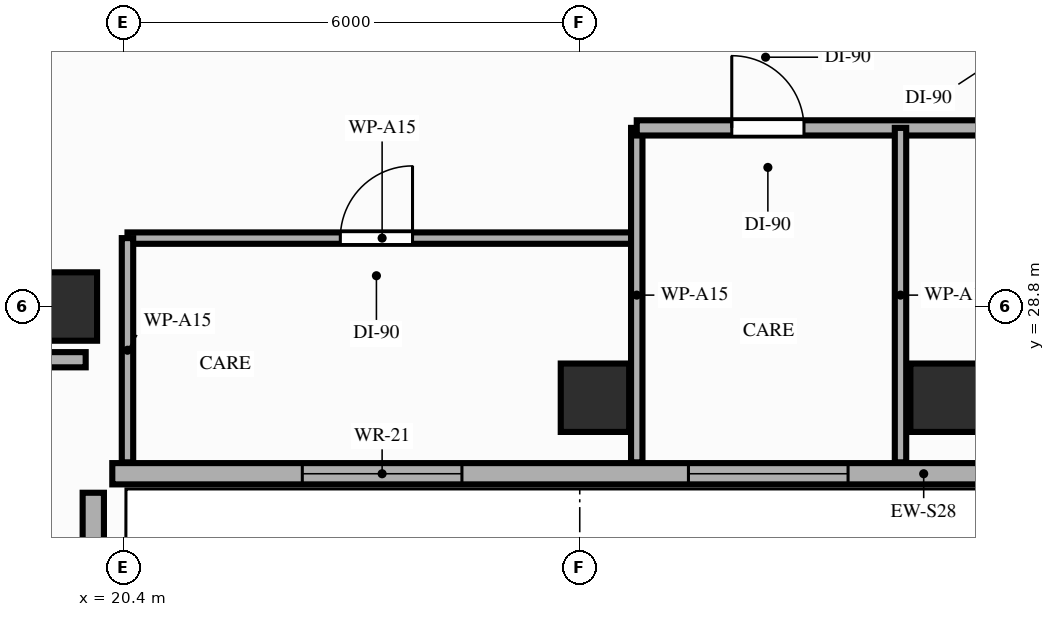
"""IFC4 building model, lengths in metres.
Left out: names, types, materials, properties, quantities, classifications, styles, units other than length and angle.
Written with IfcOpenShell. Run it as: python <this file> out.ifc"""

import sys

from ifc_helpers import new_model, si_unit, direction, frame, frame_2d, origin, origin_2d, place, context, subcontext, project, spatial, rectangle, extrude, element, fill, save


model = new_model("IFC4")
c1 = context("Model", 3, precision=1e-05, world=origin(), true_north=direction((0.0, 1.0)))
c2 = subcontext(c1, "Body", "Model", "MODEL_VIEW")
j1 = project(units=[si_unit("LENGTHUNIT", "METRE"), si_unit("PLANEANGLEUNIT", "RADIAN")], contexts=[c1])
p1 = place(None, origin())
s1 = spatial("IfcSite", under=j1, at=p1, CompositionType="ELEMENT")
p2 = place(p1, origin())
s2 = spatial("IfcBuilding", under=s1, at=p2, CompositionType="ELEMENT")
p3 = place(p2, frame((0.0, 0.0, 192.0)))
s3 = spatial("IfcBuildingStorey", under=s2, at=p3, CompositionType="ELEMENT", Elevation=192.0)
for number, where, z_axis, x_axis in (
    (1, (19.6, 28.8, 0.0), (0.0, 0.0, 1.0), (1.0, 0.0, 0.0)),
    (2, (26.6, 27.6, 0.0), (0.0, 0.0, 1.0), (1.0, 0.0, 0.0)),
    (3, (31.2, 27.6, 0.0), (0.0, 0.0, 1.0), (1.0, 0.0, 0.0)),
):
    element("IfcColumn", number, at=place(p3, frame(where, z_axis=z_axis, x_axis=x_axis)), inside=s3, PredefinedType="COLUMN", context=c2, shape_type="SweptSolid", body=[
        extrude(rectangle(XDim=0.9, YDim=0.9, at=origin_2d()), origin(), (0.0, 0.0, 1.0), 3.2),
    ])
p4 = place(p3, frame((20.0, 8.8, 0.0), z_axis=(0.0, 0.0, 1.0), x_axis=(0.0, 1.0, 0.0)))
e4 = element("IfcWall", 4, at=p4, inside=s3, PredefinedType="STANDARD", context=c2, shape_type="SweptSolid", body=[
    extrude(rectangle(XDim=17.55, YDim=0.28, at=frame_2d((8.775, 0.0))), origin(), (0.0, 0.0, 1.0), 2.51),
])
p5 = place(p4, frame((1.84, 0.0, 0.85)))
e5 = element("IfcOpeningElement", 5, at=p5, cuts=e4, PredefinedType="OPENING", context=c2, shape_type="SweptSolid", body=[
    extrude(rectangle(XDim=1.1, YDim=1.41, at=frame_2d((0.55, 0.705))), frame((0.0, 0.15, 0.0), z_axis=(0.0, -1.0, 0.0), x_axis=(1.0, 0.0, 0.0)), (0.0, 0.0, 1.0), 0.3),
])
p6 = place(p4, frame((5.45, 0.0, 0.85)))
e6 = element("IfcOpeningElement", 6, at=p6, cuts=e4, PredefinedType="OPENING", context=c2, shape_type="SweptSolid", body=[
    extrude(rectangle(XDim=2.1, YDim=1.41, at=frame_2d((1.05, 0.705))), frame((0.0, 0.15, 0.0), z_axis=(0.0, -1.0, 0.0), x_axis=(1.0, 0.0, 0.0)), (0.0, 0.0, 1.0), 0.3),
])
p7 = place(p4, frame((10.85, 0.0, 0.85)))
e7 = element("IfcOpeningElement", 7, at=p7, cuts=e4, PredefinedType="OPENING", context=c2, shape_type="SweptSolid", body=[
    extrude(rectangle(XDim=2.1, YDim=1.41, at=frame_2d((1.05, 0.705))), frame((0.0, 0.15, 0.0), z_axis=(0.0, -1.0, 0.0), x_axis=(1.0, 0.0, 0.0)), (0.0, 0.0, 1.0), 0.3),
])
p8 = place(p3, frame((20.25, 26.6, 0.0), z_axis=(0.0, 0.0, 1.0), x_axis=(1.0, 0.0, 0.0)))
e8 = element("IfcWall", 8, at=p8, inside=s3, PredefinedType="STANDARD", context=c2, shape_type="SweptSolid", body=[
    extrude(rectangle(XDim=21.35, YDim=0.28, at=frame_2d((10.675, 0.0))), origin(), (0.0, 0.0, 1.0), 2.71),
])
p9 = place(p8, frame((2.5, 0.0, 0.85)))
e9 = element("IfcOpeningElement", 9, at=p9, cuts=e8, PredefinedType="OPENING", context=c2, shape_type="SweptSolid", body=[
    extrude(rectangle(XDim=2.1, YDim=1.61, at=frame_2d((1.05, 0.805))), frame((0.0, 0.15, 0.0), z_axis=(0.0, -1.0, 0.0), x_axis=(1.0, 0.0, 0.0)), (0.0, 0.0, 1.0), 0.3),
])
p10 = place(p8, frame((18.43, 0.0, 0.85)))
e10 = element("IfcOpeningElement", 10, at=p10, cuts=e8, PredefinedType="OPENING", context=c2, shape_type="SweptSolid", body=[
    extrude(rectangle(XDim=2.1, YDim=1.61, at=frame_2d((1.05, 0.805))), frame((0.0, 0.15, 0.0), z_axis=(0.0, -1.0, 0.0), x_axis=(1.0, 0.0, 0.0)), (0.0, 0.0, 1.0), 0.3),
])
p11 = place(p8, frame((7.58, 0.0, 0.85)))
e11 = element("IfcOpeningElement", 11, at=p11, cuts=e8, PredefinedType="OPENING", context=c2, shape_type="SweptSolid", body=[
    extrude(rectangle(XDim=2.1, YDim=1.61, at=frame_2d((1.05, 0.805))), frame((0.0, 0.15, 0.0), z_axis=(0.0, -1.0, 0.0), x_axis=(1.0, 0.0, 0.0)), (0.0, 0.0, 1.0), 0.3),
])
p12 = place(p8, frame((11.54, 0.0, 0.85)))
e12 = element("IfcOpeningElement", 12, at=p12, cuts=e8, PredefinedType="OPENING", context=c2, shape_type="SweptSolid", body=[
    extrude(rectangle(XDim=2.1, YDim=1.61, at=frame_2d((1.05, 0.805))), frame((0.0, 0.15, 0.0), z_axis=(0.0, -1.0, 0.0), x_axis=(1.0, 0.0, 0.0)), (0.0, 0.0, 1.0), 0.3),
])
p13 = place(p8, frame((15.23, 0.0, 0.85)))
e13 = element("IfcOpeningElement", 13, at=p13, cuts=e8, PredefinedType="OPENING", context=c2, shape_type="SweptSolid", body=[
    extrude(rectangle(XDim=2.1, YDim=1.61, at=frame_2d((1.05, 0.805))), frame((0.0, 0.15, 0.0), z_axis=(0.0, -1.0, 0.0), x_axis=(1.0, 0.0, 0.0)), (0.0, 0.0, 1.0), 0.3),
])
p14 = place(p3, frame((9.06, 28.1, 0.0), z_axis=(0.0, 0.0, 1.0), x_axis=(1.0, 0.0, 0.0)))
e14 = element("IfcWall", 14, at=p14, inside=s3, PredefinedType="PARTITIONING", context=c2, shape_type="SweptSolid", body=[
    extrude(rectangle(XDim=10.84, YDim=0.2, at=frame_2d((5.42, 0.0))), origin(), (0.0, 0.0, 1.0), 2.51),
])
p15 = place(p3, frame((20.45, 29.7, 0.0), z_axis=(0.0, 0.0, 1.0), x_axis=(1.0, 0.0, 0.0)))
e15 = element("IfcWall", 15, at=p15, inside=s3, PredefinedType="PARTITIONING", context=c2, shape_type="SweptSolid", body=[
    extrude(rectangle(XDim=6.7, YDim=0.15, at=frame_2d((3.35, 0.0))), origin(), (0.0, 0.0, 1.0), 3.02),
])
p16 = place(p15, frame((2.8, 0.0, 0.0)))
e16 = element("IfcOpeningElement", 16, at=p16, cuts=e15, PredefinedType="OPENING", context=c2, shape_type="SweptSolid", body=[
    extrude(rectangle(XDim=0.95, YDim=2.15, at=frame_2d((0.475, 1.075))), frame((0.0, 0.085, 0.0), z_axis=(0.0, -1.0, 0.0), x_axis=(1.0, 0.0, 0.0)), (0.0, 0.0, 1.0), 0.17),
])
p17 = place(p3, frame((20.45, 26.75, 0.0), z_axis=(0.0, 0.0, 1.0), x_axis=(0.0, 1.0, 0.0)))
e17 = element("IfcWall", 17, at=p17, inside=s3, PredefinedType="PARTITIONING", context=c2, shape_type="SweptSolid", body=[
    extrude(rectangle(XDim=2.95, YDim=0.15, at=frame_2d((1.475, 0.0))), origin(), (0.0, 0.0, 1.0), 2.51),
])
p18 = place(p3, frame((27.15, 26.75, 0.0), z_axis=(0.0, 0.0, 1.0), x_axis=(0.0, 1.0, 0.0)))
e18 = element("IfcWall", 18, at=p18, inside=s3, PredefinedType="PARTITIONING", context=c2, shape_type="SweptSolid", body=[
    extrude(rectangle(XDim=4.4, YDim=0.15, at=frame_2d((2.2, 0.0))), origin(), (0.0, 0.0, 1.0), 2.51),
])
p19 = place(p3, frame((27.15, 31.15, 0.0), z_axis=(0.0, 0.0, 1.0), x_axis=(1.0, 0.0, 0.0)))
e19 = element("IfcWall", 19, at=p19, inside=s3, PredefinedType="PARTITIONING", context=c2, shape_type="SweptSolid", body=[
    extrude(rectangle(XDim=10.85, YDim=0.2, at=frame_2d((5.425, 0.0))), origin(), (0.0, 0.0, 1.0), 2.51),
])
p20 = place(p19, frame((1.25, 0.0, 0.0)))
e20 = element("IfcOpeningElement", 20, at=p20, cuts=e19, PredefinedType="OPENING", context=c2, shape_type="SweptSolid", body=[
    extrude(rectangle(XDim=0.95, YDim=2.15, at=frame_2d((0.475, 1.075))), frame((0.0, 0.11, 0.0), z_axis=(0.0, -1.0, 0.0), x_axis=(1.0, 0.0, 0.0)), (0.0, 0.0, 1.0), 0.22),
])
p21 = place(p19, frame((5.21, 0.0, 0.0)))
e21 = element("IfcOpeningElement", 21, at=p21, cuts=e19, PredefinedType="OPENING", context=c2, shape_type="SweptSolid", body=[
    extrude(rectangle(XDim=0.95, YDim=2.15, at=frame_2d((0.475, 1.075))), frame((0.0, 0.11, 0.0), z_axis=(0.0, -1.0, 0.0), x_axis=(1.0, 0.0, 0.0)), (0.0, 0.0, 1.0), 0.22),
])
p22 = place(p19, frame((8.9, 0.0, 0.0)))
e22 = element("IfcOpeningElement", 22, at=p22, cuts=e19, PredefinedType="OPENING", context=c2, shape_type="SweptSolid", body=[
    extrude(rectangle(XDim=0.95, YDim=2.15, at=frame_2d((0.475, 1.075))), frame((0.0, 0.11, 0.0), z_axis=(0.0, -1.0, 0.0), x_axis=(1.0, 0.0, 0.0)), (0.0, 0.0, 1.0), 0.22),
])
p23 = place(p3, frame((30.62, 26.75, 0.0), z_axis=(0.0, 0.0, 1.0), x_axis=(0.0, 1.0, 0.0)))
e23 = element("IfcWall", 23, at=p23, inside=s3, PredefinedType="PARTITIONING", context=c2, shape_type="SweptSolid", body=[
    extrude(rectangle(XDim=4.4, YDim=0.15, at=frame_2d((2.2, 0.0))), origin(), (0.0, 0.0, 1.0), 2.51),
])
p24 = place(p9, origin())
e24 = element("IfcWindow", 24, at=p24, inside=s3, PartitioningType="SINGLE_PANEL", PredefinedType="WINDOW", context=c2, shape_type="SweptSolid", body=[
    extrude(rectangle(XDim=2.1, YDim=1.61, at=frame_2d((1.05, 0.805))), frame((0.0, 0.03, 0.0), z_axis=(0.0, -1.0, 0.0), x_axis=(1.0, 0.0, 0.0)), (0.0, 0.0, 1.0), 0.06),
])
fill(e9, e24)
p25 = place(p11, origin())
e25 = element("IfcWindow", 25, at=p25, inside=s3, PartitioningType="SINGLE_PANEL", PredefinedType="WINDOW", context=c2, shape_type="SweptSolid", body=[
    extrude(rectangle(XDim=2.1, YDim=1.61, at=frame_2d((1.05, 0.805))), frame((0.0, 0.03, 0.0), z_axis=(0.0, -1.0, 0.0), x_axis=(1.0, 0.0, 0.0)), (0.0, 0.0, 1.0), 0.06),
])
fill(e11, e25)
p26 = place(p16, origin())
e26 = element("IfcDoor", 26, at=p26, inside=s3, OperationType="SINGLE_SWING_RIGHT", PredefinedType="DOOR", context=c2, shape_type="SweptSolid", body=[
    extrude(rectangle(XDim=0.95, YDim=2.15, at=frame_2d((0.475, 1.075))), frame((0.0, 0.025, 0.0), z_axis=(0.0, -1.0, 0.0), x_axis=(1.0, 0.0, 0.0)), (0.0, 0.0, 1.0), 0.05),
])
fill(e16, e26)
p27 = place(p20, origin())
e27 = element("IfcDoor", 27, at=p27, inside=s3, OperationType="SINGLE_SWING_LEFT", PredefinedType="DOOR", context=c2, shape_type="SweptSolid", body=[
    extrude(rectangle(XDim=0.95, YDim=2.15, at=frame_2d((0.475, 1.075))), frame((0.0, 0.025, 0.0), z_axis=(0.0, -1.0, 0.0), x_axis=(1.0, 0.0, 0.0)), (0.0, 0.0, 1.0), 0.05),
])
fill(e20, e27)
save(model, sys.argv[1])
